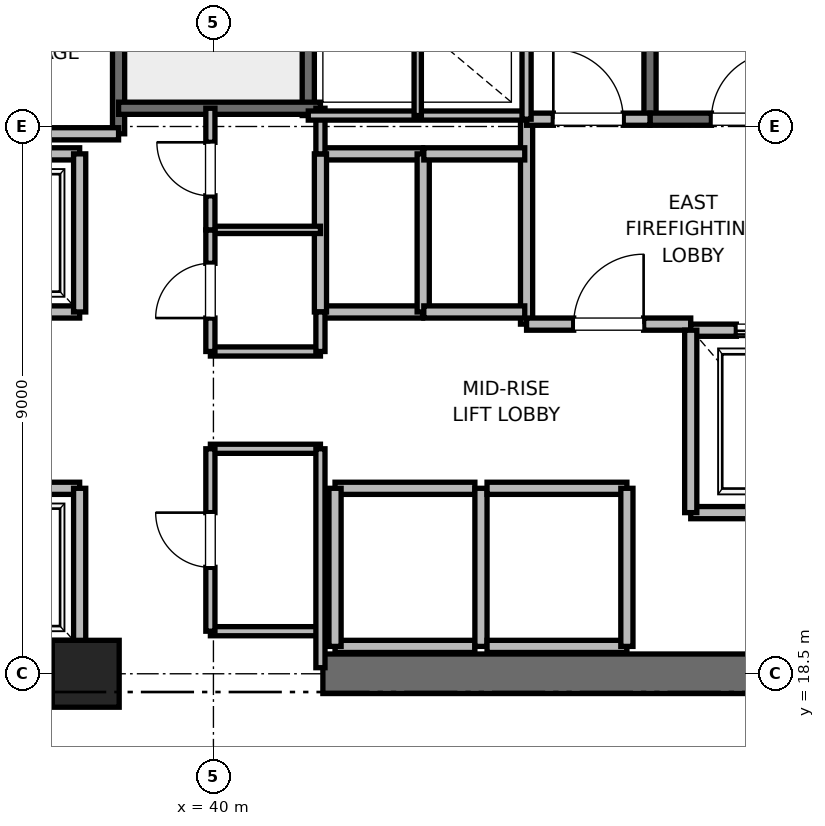
"""IFC4 building model, lengths in metres.
Left out: names, types, materials, properties, quantities, classifications, styles, units other than length and angle.
Written with IfcOpenShell. Run it as: python <this file> out.ifc"""

import sys

from ifc_helpers import new_model, si_unit, direction, frame, frame_2d, origin, origin_2d, place, context, subcontext, project, spatial, rectangle, extrude, element, fill, save


model = new_model("IFC4")
c1 = context("Model", 3, precision=1e-05, world=origin(), true_north=direction((0.0, 1.0)))
c2 = subcontext(c1, "Body", "Model", "MODEL_VIEW")
j1 = project(units=[si_unit("LENGTHUNIT", "METRE"), si_unit("PLANEANGLEUNIT", "RADIAN")], contexts=[c1])
p1 = place(None, origin())
s1 = spatial("IfcSite", under=j1, at=p1, CompositionType="ELEMENT")
p2 = place(p1, origin())
s2 = spatial("IfcBuilding", under=s1, at=p2, CompositionType="ELEMENT")
p3 = place(p2, frame((0.0, 0.0, 113.0)))
s3 = spatial("IfcBuildingStorey", under=s2, at=p3, CompositionType="ELEMENT", Elevation=113.0)
p4 = place(p3, frame((37.9, 18.5, 0.0), z_axis=(0.0, 0.0, 1.0), x_axis=(1.0, 0.0, 0.0)))
e1 = element("IfcColumn", 1, at=p4, inside=s3, PredefinedType="PILASTER", context=c2, shape_type="SweptSolid", body=[
    extrude(rectangle(XDim=1.1, YDim=1.1, at=origin_2d()), origin(), (0.0, 0.0, 1.0), 5.4),
])
for number, where, z_axis, x_axis in (
    (2, (29.0, 18.5, 0.0), (0.0, 0.0, 1.0), (1.0, 0.0, 0.0)),
    (3, (41.8, 18.5, 0.0), (0.0, 0.0, 1.0), (1.0, 0.0, 0.0)),
):
    element("IfcWall", number, at=place(p3, frame(where, z_axis=z_axis, x_axis=x_axis)), inside=s3, PredefinedType="SHEAR", context=c2, shape_type="SweptSolid", body=[
        extrude(rectangle(XDim=9.2, YDim=0.65, at=frame_2d((4.6, 0.0))), origin(), (0.0, 0.0, 1.0), 5.1),
    ])
p5 = place(p3, frame((47.18, 27.62, 0.0), z_axis=(0.0, 0.0, 1.0), x_axis=(0.0, 1.0, 0.0)))
e4 = element("IfcWall", 4, at=p5, inside=s3, PredefinedType="SOLIDWALL", context=c2, shape_type="SweptSolid", body=[
    extrude(rectangle(XDim=8.18, YDim=0.2, at=frame_2d((4.09, 0.0))), origin(), (0.0, 0.0, 1.0), 5.1),
])
p6 = place(p3, frame((47.18, 27.62, 0.0), z_axis=(0.0, 0.0, 1.0), x_axis=(1.0, 0.0, 0.0)))
e5 = element("IfcWall", 5, at=p6, inside=s3, PredefinedType="SOLIDWALL", context=c2, shape_type="SweptSolid", body=[
    extrude(rectangle(XDim=3.12, YDim=0.2, at=frame_2d((1.56, 0.0))), origin(), (0.0, 0.0, 1.0), 5.1),
])
p7 = place(p6, frame((1.01, 0.0, 0.0)))
e6 = element("IfcOpeningElement", 6, at=p7, cuts=e5, PredefinedType="OPENING", context=c2, shape_type="SweptSolid", body=[
    extrude(rectangle(XDim=1.1, YDim=2.15, at=frame_2d((0.55, 1.075))), frame((0.0, 0.1, 0.0), z_axis=(0.0, -1.0, 0.0), x_axis=(1.0, 0.0, 0.0)), (0.0, 0.0, 1.0), 0.2),
])
p8 = place(p3, frame((38.44, 27.38, 0.0), z_axis=(0.0, 0.0, 1.0), x_axis=(0.0, 1.0, 0.0)))
e7 = element("IfcWall", 7, at=p8, inside=s3, PredefinedType="SOLIDWALL", context=c2, shape_type="SweptSolid", body=[
    extrude(rectangle(XDim=8.87, YDim=0.2, at=frame_2d((4.435, 0.0))), origin(), (0.0, 0.0, 1.0), 5.1),
])
p9 = place(p3, frame((41.56, 27.68, 0.0), z_axis=(0.0, 0.0, 1.0), x_axis=(0.0, 1.0, 0.0)))
e8 = element("IfcWall", 8, at=p9, inside=s3, PredefinedType="SOLIDWALL", context=c2, shape_type="SweptSolid", body=[
    extrude(rectangle(XDim=8.57, YDim=0.2, at=frame_2d((4.285, 0.0))), origin(), (0.0, 0.0, 1.0), 5.1),
])
p10 = place(p3, frame((38.44, 27.8, 0.0), z_axis=(0.0, 0.0, 1.0), x_axis=(1.0, 0.0, 0.0)))
e9 = element("IfcWall", 9, at=p10, inside=s3, PredefinedType="SOLIDWALL", context=c2, shape_type="SweptSolid", body=[
    extrude(rectangle(XDim=3.32, YDim=0.2, at=frame_2d((1.66, 0.0))), origin(), (0.0, 0.0, 1.0), 5.1),
])
p11 = place(p3, frame((32.82, 27.38, 0.0), z_axis=(0.0, 0.0, 1.0), x_axis=(1.0, 0.0, 0.0)))
e10 = element("IfcWall", 10, at=p11, inside=s3, PredefinedType="PARTITIONING", context=c2, shape_type="SweptSolid", body=[
    extrude(rectangle(XDim=5.62, YDim=0.2, at=frame_2d((2.81, 0.0))), origin(), (0.0, 0.0, 1.0), 5.1),
])
p12 = place(p3, frame((45.15, 24.25, 0.0), z_axis=(0.0, 0.0, 1.0), x_axis=(0.0, 1.0, 0.0)))
e11 = element("IfcWall", 11, at=p12, inside=s3, PredefinedType="PARTITIONING", context=c2, shape_type="SweptSolid", body=[
    extrude(rectangle(XDim=3.37, YDim=0.2, at=frame_2d((1.685, 0.0))), origin(), (0.0, 0.0, 1.0), 5.1),
])
p13 = place(p3, frame((45.15, 24.25, 0.0), z_axis=(0.0, 0.0, 1.0), x_axis=(1.0, 0.0, 0.0)))
e12 = element("IfcWall", 12, at=p13, inside=s3, PredefinedType="PARTITIONING", context=c2, shape_type="SweptSolid", body=[
    extrude(rectangle(XDim=2.7, YDim=0.2, at=frame_2d((1.35, 0.0))), origin(), (0.0, 0.0, 1.0), 5.1),
])
p14 = place(p13, frame((0.775, 0.0, 0.0)))
e13 = element("IfcOpeningElement", 13, at=p14, cuts=e12, PredefinedType="OPENING", context=c2, shape_type="SweptSolid", body=[
    extrude(rectangle(XDim=1.15, YDim=2.2, at=frame_2d((0.575, 1.1))), frame((0.0, 0.1, 0.0), z_axis=(0.0, -1.0, 0.0), x_axis=(1.0, 0.0, 0.0)), (0.0, 0.0, 1.0), 0.2),
])
p15 = place(p3, frame((45.15, 27.62, 0.0), z_axis=(0.0, 0.0, 1.0), x_axis=(1.0, 0.0, 0.0)))
e14 = element("IfcWall", 14, at=p15, inside=s3, PredefinedType="PARTITIONING", context=c2, shape_type="SweptSolid", body=[
    extrude(rectangle(XDim=2.03, YDim=0.2, at=frame_2d((1.015, 0.0))), origin(), (0.0, 0.0, 1.0), 5.1),
])
p16 = place(p15, frame((0.44, 0.0, 0.0)))
e15 = element("IfcOpeningElement", 15, at=p16, cuts=e14, PredefinedType="OPENING", context=c2, shape_type="SweptSolid", body=[
    extrude(rectangle(XDim=1.15, YDim=2.2, at=frame_2d((0.575, 1.1))), frame((0.0, 0.1, 0.0), z_axis=(0.0, -1.0, 0.0), x_axis=(1.0, 0.0, 0.0)), (0.0, 0.0, 1.0), 0.2),
])
p17 = place(p3, frame((47.85, 21.15, 0.0), z_axis=(0.0, 0.0, 1.0), x_axis=(1.0, 0.0, 0.0)))
e16 = element("IfcWall", 16, at=p17, inside=s3, PredefinedType="SOLIDWALL", context=c2, shape_type="SweptSolid", body=[
    extrude(rectangle(XDim=2.6, YDim=0.2, at=frame_2d((1.3, 0.0))), origin(), (0.0, 0.0, 1.0), 5.1),
])
p18 = place(p3, frame((50.45, 24.15, 0.0), z_axis=(0.0, 0.0, 1.0), x_axis=(-1.0, 0.0, 0.0)))
e17 = element("IfcWall", 17, at=p18, inside=s3, PredefinedType="SOLIDWALL", context=c2, shape_type="SweptSolid", body=[
    extrude(rectangle(XDim=2.6, YDim=0.2, at=frame_2d((1.3, 0.0))), origin(), (0.0, 0.0, 1.0), 3.88),
])
p19 = place(p18, frame((0.75, 0.0, 0.0)))
e18 = element("IfcOpeningElement", 18, at=p19, cuts=e17, PredefinedType="OPENING", context=c2, shape_type="SweptSolid", body=[
    extrude(rectangle(XDim=1.1, YDim=2.2, at=frame_2d((0.55, 1.1))), frame((0.0, 0.1, 0.0), z_axis=(0.0, -1.0, 0.0), x_axis=(1.0, 0.0, 0.0)), (0.0, 0.0, 1.0), 0.2),
])
p20 = place(p3, frame((47.85, 24.15, 0.0), z_axis=(0.0, 0.0, 1.0), x_axis=(0.0, -1.0, 0.0)))
e19 = element("IfcWall", 19, at=p20, inside=s3, PredefinedType="SOLIDWALL", context=c2, shape_type="SweptSolid", body=[
    extrude(rectangle(XDim=3.0, YDim=0.2, at=frame_2d((1.5, 0.0))), origin(), (0.0, 0.0, 1.0), 5.1),
])
p21 = place(p3, frame((35.5, 18.95, 0.0), z_axis=(0.0, 0.0, 1.0), x_axis=(1.0, 0.0, 0.0)))
e20 = element("IfcWall", 20, at=p21, inside=s3, PredefinedType="SOLIDWALL", context=c2, shape_type="SweptSolid", body=[
    extrude(rectangle(XDim=2.3, YDim=0.2, at=frame_2d((1.15, 0.0))), origin(), (0.0, 0.0, 1.0), 3.88),
])
p22 = place(p3, frame((37.8, 21.55, 0.0), z_axis=(0.0, 0.0, 1.0), x_axis=(-1.0, 0.0, 0.0)))
e21 = element("IfcWall", 21, at=p22, inside=s3, PredefinedType="SOLIDWALL", context=c2, shape_type="SweptSolid", body=[
    extrude(rectangle(XDim=2.3, YDim=0.2, at=frame_2d((1.15, 0.0))), origin(), (0.0, 0.0, 1.0), 5.1),
])
p23 = place(p22, frame((0.6, 0.0, 0.0)))
e22 = element("IfcOpeningElement", 22, at=p23, cuts=e21, PredefinedType="OPENING", context=c2, shape_type="SweptSolid", body=[
    extrude(rectangle(XDim=1.1, YDim=2.2, at=frame_2d((0.55, 1.1))), frame((0.0, 0.1, 0.0), z_axis=(0.0, -1.0, 0.0), x_axis=(1.0, 0.0, 0.0)), (0.0, 0.0, 1.0), 0.2),
])
p24 = place(p3, frame((37.8, 18.95, 0.0), z_axis=(0.0, 0.0, 1.0), x_axis=(0.0, 1.0, 0.0)))
e23 = element("IfcWall", 23, at=p24, inside=s3, PredefinedType="SOLIDWALL", context=c2, shape_type="SweptSolid", body=[
    extrude(rectangle(XDim=2.6, YDim=0.2, at=frame_2d((1.3, 0.0))), origin(), (0.0, 0.0, 1.0), 3.88),
])
p25 = place(p3, frame((35.5, 24.45, 0.0), z_axis=(0.0, 0.0, 1.0), x_axis=(1.0, 0.0, 0.0)))
e24 = element("IfcWall", 24, at=p25, inside=s3, PredefinedType="SOLIDWALL", context=c2, shape_type="SweptSolid", body=[
    extrude(rectangle(XDim=2.3, YDim=0.2, at=frame_2d((1.15, 0.0))), origin(), (0.0, 0.0, 1.0), 5.1),
])
p26 = place(p25, frame((0.6, 0.0, 0.0)))
e25 = element("IfcOpeningElement", 25, at=p26, cuts=e24, PredefinedType="OPENING", context=c2, shape_type="SweptSolid", body=[
    extrude(rectangle(XDim=1.1, YDim=2.2, at=frame_2d((0.55, 1.1))), frame((0.0, 0.1, 0.0), z_axis=(0.0, -1.0, 0.0), x_axis=(1.0, 0.0, 0.0)), (0.0, 0.0, 1.0), 0.2),
])
p27 = place(p3, frame((37.8, 27.05, 0.0), z_axis=(0.0, 0.0, 1.0), x_axis=(-1.0, 0.0, 0.0)))
e26 = element("IfcWall", 26, at=p27, inside=s3, PredefinedType="SOLIDWALL", context=c2, shape_type="SweptSolid", body=[
    extrude(rectangle(XDim=2.3, YDim=0.2, at=frame_2d((1.15, 0.0))), origin(), (0.0, 0.0, 1.0), 5.1),
])
p28 = place(p3, frame((37.8, 24.45, 0.0), z_axis=(0.0, 0.0, 1.0), x_axis=(0.0, 1.0, 0.0)))
e27 = element("IfcWall", 27, at=p28, inside=s3, PredefinedType="SOLIDWALL", context=c2, shape_type="SweptSolid", body=[
    extrude(rectangle(XDim=2.6, YDim=0.2, at=frame_2d((1.3, 0.0))), origin(), (0.0, 0.0, 1.0), 5.1),
])
p29 = place(p3, frame((42.0, 18.95, 0.0), z_axis=(0.0, 0.0, 1.0), x_axis=(1.0, 0.0, 0.0)))
e28 = element("IfcWall", 28, at=p29, inside=s3, PredefinedType="SOLIDWALL", context=c2, shape_type="SweptSolid", body=[
    extrude(rectangle(XDim=2.3, YDim=0.2, at=frame_2d((1.15, 0.0))), origin(), (0.0, 0.0, 1.0), 3.88),
])
p30 = place(p3, frame((44.3, 21.55, 0.0), z_axis=(0.0, 0.0, 1.0), x_axis=(-1.0, 0.0, 0.0)))
e29 = element("IfcWall", 29, at=p30, inside=s3, PredefinedType="SOLIDWALL", context=c2, shape_type="SweptSolid", body=[
    extrude(rectangle(XDim=2.3, YDim=0.2, at=frame_2d((1.15, 0.0))), origin(), (0.0, 0.0, 1.0), 5.1),
])
p31 = place(p3, frame((42.0, 21.55, 0.0), z_axis=(0.0, 0.0, 1.0), x_axis=(0.0, -1.0, 0.0)))
e30 = element("IfcWall", 30, at=p31, inside=s3, PredefinedType="SOLIDWALL", context=c2, shape_type="SweptSolid", body=[
    extrude(rectangle(XDim=2.6, YDim=0.2, at=frame_2d((1.3, 0.0))), origin(), (0.0, 0.0, 1.0), 3.88),
])
p32 = place(p3, frame((44.4, 18.95, 0.0), z_axis=(0.0, 0.0, 1.0), x_axis=(0.0, 1.0, 0.0)))
e31 = element("IfcWall", 31, at=p32, inside=s3, PredefinedType="SOLIDWALL", context=c2, shape_type="SweptSolid", body=[
    extrude(rectangle(XDim=2.6, YDim=0.2, at=frame_2d((1.3, 0.0))), origin(), (0.0, 0.0, 1.0), 5.1),
])
for number, where, z_axis, x_axis in (
    (32, (44.5, 18.95, 0.0), (0.0, 0.0, 1.0), (1.0, 0.0, 0.0)),
    (33, (46.8, 21.55, 0.0), (0.0, 0.0, 1.0), (-1.0, 0.0, 0.0)),
):
    element("IfcWall", number, at=place(p3, frame(where, z_axis=z_axis, x_axis=x_axis)), inside=s3, PredefinedType="SOLIDWALL", context=c2, shape_type="SweptSolid", body=[
        extrude(rectangle(XDim=2.3, YDim=0.2, at=frame_2d((1.15, 0.0))), origin(), (0.0, 0.0, 1.0), 5.1),
    ])
p33 = place(p3, frame((46.8, 18.95, 0.0), z_axis=(0.0, 0.0, 1.0), x_axis=(0.0, 1.0, 0.0)))
e34 = element("IfcWall", 34, at=p33, inside=s3, PredefinedType="SOLIDWALL", context=c2, shape_type="SweptSolid", body=[
    extrude(rectangle(XDim=2.6, YDim=0.2, at=frame_2d((1.3, 0.0))), origin(), (0.0, 0.0, 1.0), 5.1),
])
for number, where, z_axis, x_axis in (
    (35, (41.76, 24.45, 0.0), (0.0, 0.0, 1.0), (1.0, 0.0, 0.0)),
    (36, (43.44, 27.05, 0.0), (0.0, 0.0, 1.0), (-1.0, 0.0, 0.0)),
):
    element("IfcWall", number, at=place(p3, frame(where, z_axis=z_axis, x_axis=x_axis)), inside=s3, PredefinedType="SOLIDWALL", context=c2, shape_type="SweptSolid", body=[
        extrude(rectangle(XDim=1.68, YDim=0.2, at=frame_2d((0.84, 0.0))), origin(), (0.0, 0.0, 1.0), 5.1),
    ])
for number, where, z_axis, x_axis in (
    (37, (41.76, 27.05, 0.0), (0.0, 0.0, 1.0), (0.0, -1.0, 0.0)),
    (38, (43.45, 24.45, 0.0), (0.0, 0.0, 1.0), (0.0, 1.0, 0.0)),
):
    element("IfcWall", number, at=place(p3, frame(where, z_axis=z_axis, x_axis=x_axis)), inside=s3, PredefinedType="SOLIDWALL", context=c2, shape_type="SweptSolid", body=[
        extrude(rectangle(XDim=2.6, YDim=0.2, at=frame_2d((1.3, 0.0))), origin(), (0.0, 0.0, 1.0), 5.1),
    ])
for number, where, z_axis, x_axis in (
    (39, (43.46, 24.45, 0.0), (0.0, 0.0, 1.0), (1.0, 0.0, 0.0)),
    (40, (45.12, 27.05, 0.0), (0.0, 0.0, 1.0), (-1.0, 0.0, 0.0)),
):
    element("IfcWall", number, at=place(p3, frame(where, z_axis=z_axis, x_axis=x_axis)), inside=s3, PredefinedType="SOLIDWALL", context=c2, shape_type="SweptSolid", body=[
        extrude(rectangle(XDim=1.66, YDim=0.2, at=frame_2d((0.83, 0.0))), origin(), (0.0, 0.0, 1.0), 5.1),
    ])
for number, where, z_axis, x_axis in (
    (41, (39.95, 19.2, 0.0), (0.0, 0.0, 1.0), (1.0, 0.0, 0.0)),
    (42, (39.95, 22.2, 0.0), (0.0, 0.0, 1.0), (1.0, 0.0, 0.0)),
    (43, (39.95, 23.8, 0.0), (0.0, 0.0, 1.0), (1.0, 0.0, 0.0)),
):
    element("IfcWall", number, at=place(p3, frame(where, z_axis=z_axis, x_axis=x_axis)), inside=s3, PredefinedType="PARTITIONING", context=c2, shape_type="SweptSolid", body=[
        extrude(rectangle(XDim=1.81, YDim=0.15, at=frame_2d((0.905, 0.0))), origin(), (0.0, 0.0, 1.0), 2.85),
    ])
p34 = place(p3, frame((39.95, 25.8, 0.0), z_axis=(0.0, 0.0, 1.0), x_axis=(1.0, 0.0, 0.0)))
e44 = element("IfcWall", 44, at=p34, inside=s3, PredefinedType="PARTITIONING", context=c2, shape_type="SweptSolid", body=[
    extrude(rectangle(XDim=1.81, YDim=0.12, at=frame_2d((0.905, 0.0))), origin(), (0.0, 0.0, 1.0), 2.85),
])
p35 = place(p3, frame((41.76, 18.6, 0.0), z_axis=(0.0, 0.0, 1.0), x_axis=(0.0, 1.0, 0.0)))
e45 = element("IfcWall", 45, at=p35, inside=s3, PredefinedType="PARTITIONING", context=c2, shape_type="SweptSolid", body=[
    extrude(rectangle(XDim=3.6, YDim=0.15, at=frame_2d((1.8, 0.0))), origin(), (0.0, 0.0, 1.0), 2.85),
])
p36 = place(p3, frame((41.76, 23.8, 0.0), z_axis=(0.0, 0.0, 1.0), x_axis=(0.0, 1.0, 0.0)))
e46 = element("IfcWall", 46, at=p36, inside=s3, PredefinedType="PARTITIONING", context=c2, shape_type="SweptSolid", body=[
    extrude(rectangle(XDim=0.65, YDim=0.15, at=frame_2d((0.325, 0.0))), origin(), (0.0, 0.0, 1.0), 2.85),
])
p37 = place(p3, frame((41.76, 27.05, 0.0), z_axis=(0.0, 0.0, 1.0), x_axis=(0.0, 1.0, 0.0)))
e47 = element("IfcWall", 47, at=p37, inside=s3, PredefinedType="PARTITIONING", context=c2, shape_type="SweptSolid", body=[
    extrude(rectangle(XDim=0.75, YDim=0.15, at=frame_2d((0.375, 0.0))), origin(), (0.0, 0.0, 1.0), 2.85),
])
p38 = place(p3, frame((39.95, 19.2, 0.0), z_axis=(0.0, 0.0, 1.0), x_axis=(0.0, 1.0, 0.0)))
e48 = element("IfcWall", 48, at=p38, inside=s3, PredefinedType="PARTITIONING", context=c2, shape_type="SweptSolid", body=[
    extrude(rectangle(XDim=3.0, YDim=0.15, at=frame_2d((1.5, 0.0))), origin(), (0.0, 0.0, 1.0), 2.85),
])
p39 = place(p38, frame((1.05, 0.0, 0.0)))
e49 = element("IfcOpeningElement", 49, at=p39, cuts=e48, PredefinedType="OPENING", context=c2, shape_type="SweptSolid", body=[
    extrude(rectangle(XDim=0.9, YDim=2.1, at=frame_2d((0.45, 1.05))), frame((0.0, 0.075, 0.0), z_axis=(0.0, -1.0, 0.0), x_axis=(1.0, 0.0, 0.0)), (0.0, 0.0, 1.0), 0.15),
])
p40 = place(p3, frame((39.95, 23.8, 0.0), z_axis=(0.0, 0.0, 1.0), x_axis=(0.0, 1.0, 0.0)))
e50 = element("IfcWall", 50, at=p40, inside=s3, PredefinedType="PARTITIONING", context=c2, shape_type="SweptSolid", body=[
    extrude(rectangle(XDim=2.0, YDim=0.15, at=frame_2d((1.0, 0.0))), origin(), (0.0, 0.0, 1.0), 2.85),
])
p41 = place(p40, frame((0.55, 0.0, 0.0)))
e51 = element("IfcOpeningElement", 51, at=p41, cuts=e50, PredefinedType="OPENING", context=c2, shape_type="SweptSolid", body=[
    extrude(rectangle(XDim=0.9, YDim=2.1, at=frame_2d((0.45, 1.05))), frame((0.0, 0.075, 0.0), z_axis=(0.0, -1.0, 0.0), x_axis=(1.0, 0.0, 0.0)), (0.0, 0.0, 1.0), 0.15),
])
p42 = place(p3, frame((39.95, 25.8, 0.0), z_axis=(0.0, 0.0, 1.0), x_axis=(0.0, 1.0, 0.0)))
e52 = element("IfcWall", 52, at=p42, inside=s3, PredefinedType="PARTITIONING", context=c2, shape_type="SweptSolid", body=[
    extrude(rectangle(XDim=2.0, YDim=0.15, at=frame_2d((1.0, 0.0))), origin(), (0.0, 0.0, 1.0), 2.85),
])
p43 = place(p42, frame((0.56, 0.0, 0.0)))
e53 = element("IfcOpeningElement", 53, at=p43, cuts=e52, PredefinedType="OPENING", context=c2, shape_type="SweptSolid", body=[
    extrude(rectangle(XDim=0.88, YDim=2.1, at=frame_2d((0.44, 1.05))), frame((0.0, 0.075, 0.0), z_axis=(0.0, -1.0, 0.0), x_axis=(1.0, 0.0, 0.0)), (0.0, 0.0, 1.0), 0.15),
])
p44 = place(p3, frame((41.56, 27.68, 0.0), z_axis=(0.0, 0.0, 1.0), x_axis=(1.0, 0.0, 0.0)))
e54 = element("IfcWall", 54, at=p44, inside=s3, PredefinedType="PARTITIONING", context=c2, shape_type="SweptSolid", body=[
    extrude(rectangle(XDim=3.59, YDim=0.15, at=frame_2d((1.795, 0.0))), origin(), (0.0, 0.0, 1.0), 2.85),
])
p45 = place(p3, frame((45.15, 27.62, 0.0), z_axis=(0.0, 0.0, 1.0), x_axis=(0.0, 1.0, 0.0)))
e55 = element("IfcWall", 55, at=p45, inside=s3, PredefinedType="PARTITIONING", context=c2, shape_type="SweptSolid", body=[
    extrude(rectangle(XDim=3.1, YDim=0.15, at=frame_2d((1.55, 0.0))), origin(), (0.0, 0.0, 1.0), 2.85),
])
p46 = place(p3, frame((43.36, 27.68, 0.0), z_axis=(0.0, 0.0, 1.0), x_axis=(0.0, 1.0, 0.0)))
e56 = element("IfcWall", 56, at=p46, inside=s3, PredefinedType="PARTITIONING", context=c2, shape_type="SweptSolid", body=[
    extrude(rectangle(XDim=3.04, YDim=0.12, at=frame_2d((1.52, 0.0))), origin(), (0.0, 0.0, 1.0), 2.85),
])
p47 = place(p7, origin())
e57 = element("IfcDoor", 57, at=p47, inside=s3, OperationType="SINGLE_SWING_RIGHT", PredefinedType="DOOR", context=c2, shape_type="SweptSolid", body=[
    extrude(rectangle(XDim=1.1, YDim=2.15, at=frame_2d((0.55, 1.075))), frame((0.0, 0.025, 0.0), z_axis=(0.0, -1.0, 0.0), x_axis=(1.0, 0.0, 0.0)), (0.0, 0.0, 1.0), 0.05),
])
fill(e6, e57)
p48 = place(p14, origin())
e58 = element("IfcDoor", 58, at=p48, inside=s3, OperationType="SINGLE_SWING_RIGHT", PredefinedType="DOOR", context=c2, shape_type="SweptSolid", body=[
    extrude(rectangle(XDim=1.15, YDim=2.2, at=frame_2d((0.575, 1.1))), frame((0.0, 0.025, 0.0), z_axis=(0.0, -1.0, 0.0), x_axis=(1.0, 0.0, 0.0)), (0.0, 0.0, 1.0), 0.05),
])
fill(e13, e58)
p49 = place(p16, origin())
e59 = element("IfcDoor", 59, at=p49, inside=s3, OperationType="SINGLE_SWING_LEFT", PredefinedType="DOOR", context=c2, shape_type="SweptSolid", body=[
    extrude(rectangle(XDim=1.15, YDim=2.2, at=frame_2d((0.575, 1.1))), frame((0.0, 0.025, 0.0), z_axis=(0.0, -1.0, 0.0), x_axis=(1.0, 0.0, 0.0)), (0.0, 0.0, 1.0), 0.05),
])
fill(e15, e59)
p50 = place(p19, origin())
e60 = element("IfcDoor", 60, at=p50, inside=s3, OperationType="SLIDING_TO_RIGHT", PredefinedType="DOOR", context=c2, shape_type="SweptSolid", body=[
    extrude(rectangle(XDim=1.1, YDim=2.2, at=frame_2d((0.55, 1.1))), frame((0.0, 0.025, 0.0), z_axis=(0.0, -1.0, 0.0), x_axis=(1.0, 0.0, 0.0)), (0.0, 0.0, 1.0), 0.05),
])
fill(e18, e60)
p51 = place(p39, origin())
e61 = element("IfcDoor", 61, at=p51, inside=s3, OperationType="SINGLE_SWING_RIGHT", PredefinedType="DOOR", context=c2, shape_type="SweptSolid", body=[
    extrude(rectangle(XDim=0.9, YDim=2.1, at=frame_2d((0.45, 1.05))), frame((0.0, 0.025, 0.0), z_axis=(0.0, -1.0, 0.0), x_axis=(1.0, 0.0, 0.0)), (0.0, 0.0, 1.0), 0.05),
])
fill(e49, e61)
p52 = place(p41, origin())
e62 = element("IfcDoor", 62, at=p52, inside=s3, OperationType="SINGLE_SWING_LEFT", PredefinedType="DOOR", context=c2, shape_type="SweptSolid", body=[
    extrude(rectangle(XDim=0.9, YDim=2.1, at=frame_2d((0.45, 1.05))), frame((0.0, 0.025, 0.0), z_axis=(0.0, -1.0, 0.0), x_axis=(1.0, 0.0, 0.0)), (0.0, 0.0, 1.0), 0.05),
])
fill(e51, e62)
p53 = place(p43, origin())
e63 = element("IfcDoor", 63, at=p53, inside=s3, OperationType="SINGLE_SWING_RIGHT", PredefinedType="DOOR", context=c2, shape_type="SweptSolid", body=[
    extrude(rectangle(XDim=0.88, YDim=2.1, at=frame_2d((0.44, 1.05))), frame((0.0, 0.025, 0.0), z_axis=(0.0, -1.0, 0.0), x_axis=(1.0, 0.0, 0.0)), (0.0, 0.0, 1.0), 0.05),
])
fill(e53, e63)
save(model, sys.argv[1])
